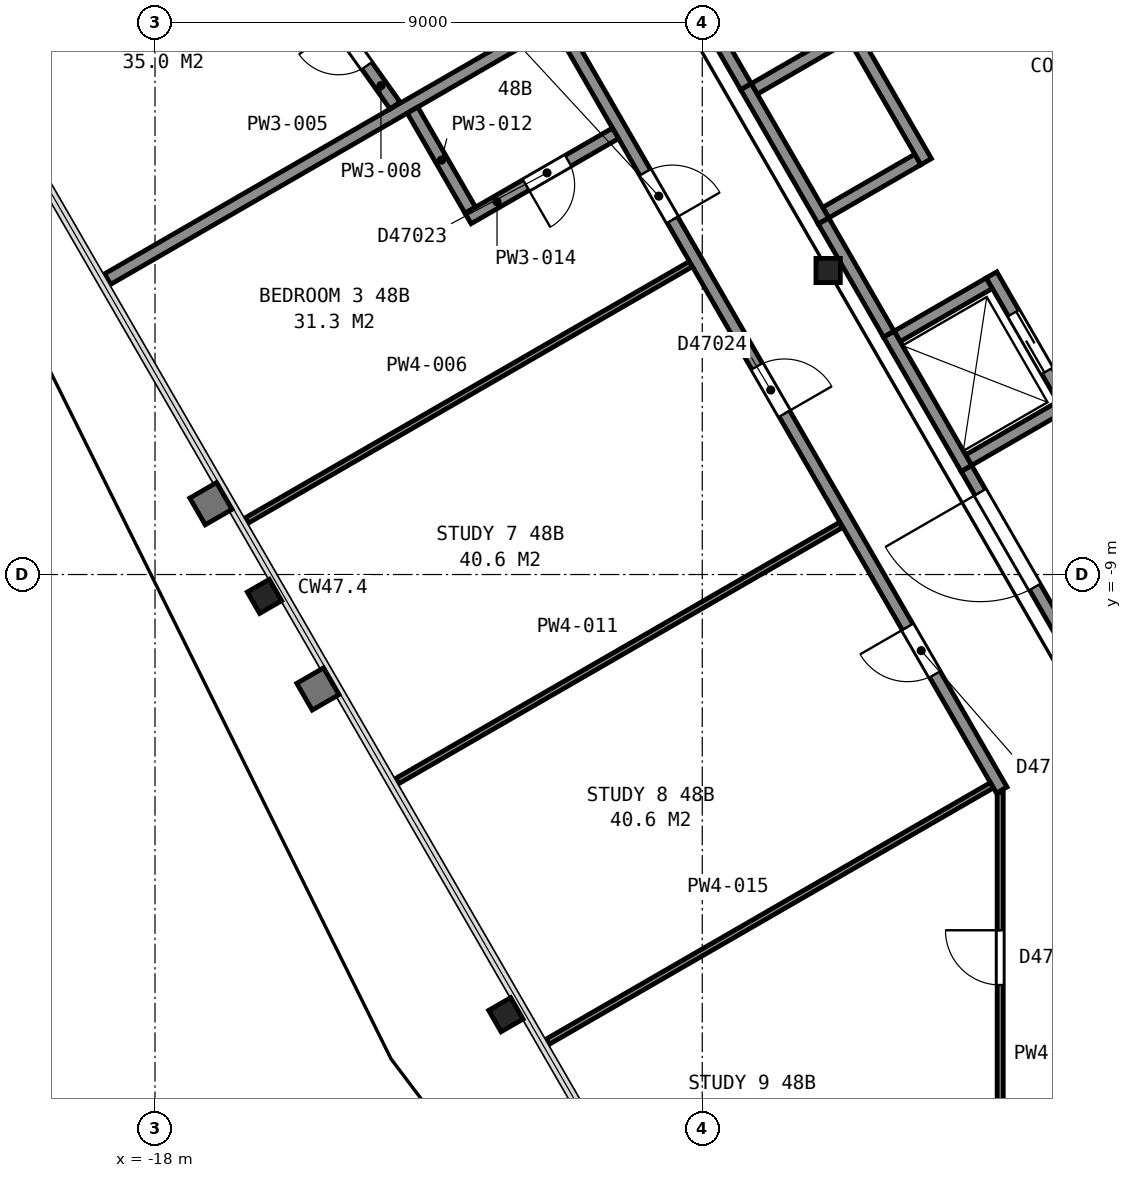
"""IFC4 building model, lengths in metres.
Left out: names, types, materials, properties, quantities, classifications, styles, units other than length and angle.
Written with IfcOpenShell. Run it as: python <this file> out.ifc"""

import sys

from ifc_helpers import new_model, si_unit, direction, frame, frame_2d, origin, origin_2d, place, context, subcontext, project, spatial, rectangle, i_section, extrude, element, fill, save


model = new_model("IFC4")
c1 = context("Model", 3, precision=1e-05, world=origin(), true_north=direction((0.0, 1.0)))
c2 = subcontext(c1, "Body", "Model", "MODEL_VIEW")
j1 = project(units=[si_unit("LENGTHUNIT", "METRE"), si_unit("PLANEANGLEUNIT", "RADIAN")], contexts=[c1])
p1 = place(None, origin())
s1 = spatial("IfcSite", under=j1, at=p1, CompositionType="ELEMENT")
p2 = place(p1, origin())
s2 = spatial("IfcBuilding", under=s1, at=p2, CompositionType="ELEMENT")
p3 = place(p2, frame((0.0, 0.0, 193.2)))
s3 = spatial("IfcBuildingStorey", under=s2, at=p3, CompositionType="ELEMENT", Elevation=193.2)
for number, where, z_axis, x_axis in (
    (1, (-16.2, -9.36, 0.0), (0.0, 0.0, 1.0), (-0.5, 0.866, 0.0)),
    (2, (-12.23, -16.24, 0.0), (0.0, 0.0, 1.0), (-0.5, 0.866, 0.0)),
):
    element("IfcColumn", number, at=place(p3, frame(where, z_axis=z_axis, x_axis=x_axis)), inside=s3, PredefinedType="COLUMN", context=c2, shape_type="SweptSolid", body=[
        extrude(i_section(OverallWidth=0.406, OverallDepth=0.417, WebThickness=0.03, FlangeThickness=0.048, FilletRadius=0.015, at=origin_2d()), origin(), (0.0, 0.0, 1.0), 3.7),
    ])
p4 = place(p3, frame((-6.93, -4.0, 0.0), z_axis=(0.0, 0.0, 1.0), x_axis=(1.0, 0.0, 0.0)))
e3 = element("IfcColumn", 3, at=p4, inside=s3, PredefinedType="COLUMN", context=c2, shape_type="SweptSolid", body=[
    extrude(i_section(OverallWidth=0.401, OverallDepth=0.399, WebThickness=0.025, FlangeThickness=0.04, FilletRadius=0.015, at=origin_2d()), origin(), (0.0, 0.0, 1.0), 3.7),
])
for number, where, z_axis, x_axis in (
    (4, (-4.62, -7.118, 0.0), (0.0, 0.0, 1.0), (0.866, 0.5, 0.0)),
    (5, (-5.795, -5.083, 0.0), (0.0, 0.0, 1.0), (0.866, 0.5, 0.0)),
    (6, (-6.97, -3.048, 0.0), (0.0, 0.0, 1.0), (0.866, 0.5, 0.0)),
):
    element("IfcWall", number, at=place(p3, frame(where, z_axis=z_axis, x_axis=x_axis)), inside=s3, PredefinedType="PARTITIONING", context=c2, shape_type="SweptSolid", body=[
        extrude(rectangle(XDim=1.75, YDim=0.2, at=frame_2d((0.875, 0.0))), origin(), (0.0, 0.0, 1.0), 3.7),
    ])
p5 = place(p3, frame((-8.145, -1.013, 0.0), z_axis=(0.0, 0.0, 1.0), x_axis=(0.866016494683, 0.500015430699, 0.0)))
e7 = element("IfcWall", 7, at=p5, inside=s3, PredefinedType="PARTITIONING", context=c2, shape_type="SweptSolid", body=[
    extrude(rectangle(XDim=3.15, YDim=0.2, at=frame_2d((1.575, 0.0))), origin(), (0.0, 0.0, 1.0), 3.7),
])
p6 = place(p3, frame((-2.968, -6.28, 0.0), z_axis=(0.0, 0.0, 1.0), x_axis=(-0.499990435942, 0.866030925526, 0.0)))
e8 = element("IfcWall", 8, at=p6, inside=s3, PredefinedType="PARTITIONING", context=c2, shape_type="SweptSolid", body=[
    extrude(rectangle(XDim=2.55, YDim=0.2, at=frame_2d((1.275, 0.0))), origin(), (0.0, 0.0, 1.0), 3.7),
])
p7 = place(p6, frame((0.725, 0.0, 0.0)))
e9 = element("IfcOpeningElement", 9, at=p7, cuts=e8, PredefinedType="OPENING", context=c2, shape_type="SweptSolid", body=[
    extrude(rectangle(XDim=1.1, YDim=2.1, at=frame_2d((0.55, 1.05))), frame((0.0, 0.11, 0.0), z_axis=(0.0, -1.0, 0.0), x_axis=(1.0, 0.0, 0.0)), (0.0, 0.0, 1.0), 0.22),
])
p8 = place(p3, frame((-5.318, -2.21, 0.0), z_axis=(0.0, 0.0, 1.0), x_axis=(-0.499938297808, 0.866061024631, 0.0)))
e10 = element("IfcWall", 10, at=p8, inside=s3, PredefinedType="PARTITIONING", context=c2, shape_type="SweptSolid", body=[
    extrude(rectangle(XDim=2.35, YDim=0.2, at=frame_2d((1.175, 0.0))), origin(), (0.0, 0.0, 1.0), 3.7),
])
p9 = place(p3, frame((-7.242, -0.376, 0.0), z_axis=(0.0, 0.0, 1.0), x_axis=(-0.499996545922, 0.866027397988, 0.0)))
e11 = element("IfcWall", 11, at=p9, inside=s3, PredefinedType="PARTITIONING", context=c2, shape_type="SweptSolid", body=[
    extrude(rectangle(XDim=2.75, YDim=0.2, at=frame_2d((1.375, 0.0))), origin(), (0.0, 0.0, 1.0), 3.7),
])
for number, where, z_axis, x_axis in (
    (12, (-4.656, -7.255, 0.0), (0.0, 0.0, 1.0), (-0.5, 0.866, 0.0)),
    (13, (-7.006, -3.185, 0.0), (0.0, 0.0, 1.0), (-0.5, 0.866, 0.0)),
):
    element("IfcWall", number, at=place(p3, frame(where, z_axis=z_axis, x_axis=x_axis)), inside=s3, PredefinedType="PARTITIONING", context=c2, shape_type="SweptSolid", body=[
        extrude(rectangle(XDim=2.55, YDim=0.2, at=frame_2d((1.275, 0.0))), origin(), (0.0, 0.0, 1.0), 3.7),
    ])
p10 = place(p3, frame((-11.591, 4.755, 0.0), z_axis=(0.0, 0.0, 1.0), x_axis=(0.500043977787, -0.866000011708, 0.0)))
e14 = element("IfcWall", 14, at=p10, inside=s3, PredefinedType="PARTITIONING", context=c2, shape_type="SweptSolid", body=[
    extrude(rectangle(XDim=6.617, YDim=0.2, at=frame_2d((3.308, 0.0))), origin(), (0.0, 0.0, 1.0), 3.45),
])
p11 = place(p10, frame((3.695, 0.0, 0.0)))
e15 = element("IfcOpeningElement", 15, at=p11, cuts=e14, PredefinedType="OPENING", context=c2, shape_type="SweptSolid", body=[
    extrude(rectangle(XDim=1.8, YDim=2.1, at=frame_2d((0.9, 1.05))), frame((0.0, 0.11, 0.0), z_axis=(0.0, -1.0, 0.0), x_axis=(1.0, 0.0, 0.0)), (0.0, 0.0, 1.0), 0.22),
])
p12 = place(p3, frame((-7.005, -3.187, 0.0), z_axis=(0.0, 0.0, 1.0), x_axis=(0.499689606989, -0.866204535123, 0.0)))
e16 = element("IfcWall", 16, at=p12, inside=s3, PredefinedType="PARTITIONING", context=c2, shape_type="SweptSolid", body=[
    extrude(rectangle(XDim=2.145, YDim=0.2, at=frame_2d((1.072, 0.0))), origin(), (0.0, 0.0, 1.0), 3.45),
])
p13 = place(p3, frame((-4.655, -7.257, 0.0), z_axis=(0.0, 0.0, 1.0), x_axis=(0.499966124405, -0.866044960985, 0.0)))
e17 = element("IfcWall", 17, at=p13, inside=s3, PredefinedType="PARTITIONING", context=c2, shape_type="SweptSolid", body=[
    extrude(rectangle(XDim=5.956, YDim=0.2, at=frame_2d((2.978, 0.0))), origin(), (0.0, 0.0, 1.0), 3.45),
])
p14 = place(p13, frame((0.45, 0.0, 0.0)))
e18 = element("IfcOpeningElement", 18, at=p14, cuts=e17, PredefinedType="OPENING", context=c2, shape_type="SweptSolid", body=[
    extrude(rectangle(XDim=1.8, YDim=2.1, at=frame_2d((0.9, 1.05))), frame((0.0, 0.11, 0.0), z_axis=(0.0, -1.0, 0.0), x_axis=(1.0, 0.0, 0.0)), (0.0, 0.0, 1.0), 0.22),
])
p15 = place(p3, frame((-18.78, -4.142, 0.0), z_axis=(0.0, 0.0, 1.0), x_axis=(0.866020616849, 0.500008291124, 0.0)))
e19 = element("IfcWall", 19, at=p15, inside=s3, PredefinedType="PARTITIONING", context=c2, shape_type="SweptSolid", body=[
    extrude(rectangle(XDim=8.428, YDim=0.2, at=frame_2d((4.214, 0.0))), origin(), (0.0, 0.0, 1.0), 2.713),
])
p16 = place(p3, frame((-16.489, -8.11, 0.0), z_axis=(0.0, 0.0, 1.0), x_axis=(0.865995531057, 0.500051737513, 0.0)))
e20 = element("IfcWall", 20, at=p16, inside=s3, PredefinedType="PARTITIONING", context=c2, shape_type="SweptSolid", body=[
    extrude(rectangle(XDim=8.429, YDim=0.1, at=frame_2d((4.214, 0.0))), origin(), (0.0, 0.0, 1.0), 2.713),
])
p17 = place(p3, frame((-15.438, 0.663, 0.0), z_axis=(0.0, 0.0, 1.0), x_axis=(0.579721135961, -0.81481495109, 0.0)))
e21 = element("IfcWall", 21, at=p17, inside=s3, PredefinedType="PARTITIONING", context=c2, shape_type="SweptSolid", body=[
    extrude(rectangle(XDim=2.392, YDim=0.2, at=frame_2d((1.196, 0.0))), origin(), (0.0, 0.0, 1.0), 2.713),
])
p18 = place(p17, frame((0.79, 0.0, 0.0)))
e22 = element("IfcOpeningElement", 22, at=p18, cuts=e21, PredefinedType="OPENING", context=c2, shape_type="SweptSolid", body=[
    extrude(rectangle(XDim=0.8, YDim=2.1, at=frame_2d((0.4, 1.05))), frame((0.0, 0.11, 0.0), z_axis=(0.0, -1.0, 0.0), x_axis=(1.0, 0.0, 0.0)), (0.0, 0.0, 1.0), 0.22),
])
p19 = place(p3, frame((-14.015, -12.396, 0.0), z_axis=(0.0, 0.0, 1.0), x_axis=(0.866079962101, 0.499905490315, 0.0)))
e23 = element("IfcWall", 23, at=p19, inside=s3, PredefinedType="PARTITIONING", context=c2, shape_type="SweptSolid", body=[
    extrude(rectangle(XDim=8.429, YDim=0.1, at=frame_2d((4.214, 0.0))), origin(), (0.0, 0.0, 1.0), 2.713),
])
p20 = place(p3, frame((-13.765, -1.362, 0.0), z_axis=(0.0, 0.0, 1.0), x_axis=(0.499911523785, -0.866076479525, 0.0)))
e24 = element("IfcWall", 24, at=p20, inside=s3, PredefinedType="PARTITIONING", context=c2, shape_type="SweptSolid", body=[
    extrude(rectangle(XDim=1.9, YDim=0.2, at=frame_2d((0.95, 0.0))), origin(), (0.0, 0.0, 1.0), 2.713),
])
p21 = place(p3, frame((-4.075, -12.545, 0.0), z_axis=(0.0, 0.0, 1.0), x_axis=(-0.499999743747, 0.866025551732, 0.0)))
e25 = element("IfcWall", 25, at=p21, inside=s3, PredefinedType="PARTITIONING", context=c2, shape_type="SweptSolid", body=[
    extrude(rectangle(XDim=17.656, YDim=0.2, at=frame_2d((8.828, 0.0))), origin(), (0.0, 0.0, 1.0), 2.713),
])
p22 = place(p21, frame((10.83, 0.0, 0.0)))
e26 = element("IfcOpeningElement", 26, at=p22, cuts=e25, PredefinedType="OPENING", context=c2, shape_type="SweptSolid", body=[
    extrude(rectangle(XDim=0.9, YDim=2.1, at=frame_2d((0.45, 1.05))), frame((0.0, 0.11, 0.0), z_axis=(0.0, -1.0, 0.0), x_axis=(1.0, 0.0, 0.0)), (0.0, 0.0, 1.0), 0.22),
])
p23 = place(p21, frame((7.148, 0.0, 0.0)))
e27 = element("IfcOpeningElement", 27, at=p23, cuts=e25, PredefinedType="OPENING", context=c2, shape_type="SweptSolid", body=[
    extrude(rectangle(XDim=0.9, YDim=2.1, at=frame_2d((0.45, 1.05))), frame((0.0, 0.11, 0.0), z_axis=(0.0, -1.0, 0.0), x_axis=(1.0, 0.0, 0.0)), (0.0, 0.0, 1.0), 0.22),
])
p24 = place(p21, frame((2.198, 0.0, 0.0)))
e28 = element("IfcOpeningElement", 28, at=p24, cuts=e25, PredefinedType="OPENING", context=c2, shape_type="SweptSolid", body=[
    extrude(rectangle(XDim=0.9, YDim=2.1, at=frame_2d((0.45, 1.05))), frame((0.0, 0.11, 0.0), z_axis=(0.0, -1.0, 0.0), x_axis=(1.0, 0.0, 0.0)), (0.0, 0.0, 1.0), 0.22),
])
p25 = place(p3, frame((-12.852, -3.144, 0.0), z_axis=(0.0, 0.0, 1.0), x_axis=(0.866018616679, 0.500011755427, 0.0)))
e29 = element("IfcWall", 29, at=p25, inside=s3, PredefinedType="PARTITIONING", context=c2, shape_type="SweptSolid", body=[
    extrude(rectangle(XDim=2.8, YDim=0.2, at=frame_2d((1.4, 0.0))), origin(), (0.0, 0.0, 1.0), 2.713),
])
p26 = place(p25, frame((1.1, 0.0, 0.0)))
e30 = element("IfcOpeningElement", 30, at=p26, cuts=e29, PredefinedType="OPENING", context=c2, shape_type="SweptSolid", body=[
    extrude(rectangle(XDim=0.8, YDim=2.1, at=frame_2d((0.4, 1.05))), frame((0.0, 0.11, 0.0), z_axis=(0.0, -1.0, 0.0), x_axis=(1.0, 0.0, 0.0)), (0.0, 0.0, 1.0), 0.22),
])
p27 = place(p3, frame((-11.54, -16.682, 0.0), z_axis=(0.0, 0.0, 1.0), x_axis=(0.866063141794, 0.499934630153, 0.0)))
e31 = element("IfcWall", 31, at=p27, inside=s3, PredefinedType="PARTITIONING", context=c2, shape_type="SweptSolid", body=[
    extrude(rectangle(XDim=8.433, YDim=0.1, at=frame_2d((4.217, 0.0))), origin(), (0.0, 0.0, 1.0), 2.713),
])
p28 = place(p3, frame((-4.1, -18.016, 0.0), z_axis=(0.0, 0.0, 1.0), x_axis=(0.0, 1.0, 0.0)))
e32 = element("IfcWall", 32, at=p28, inside=s3, PredefinedType="PARTITIONING", context=c2, shape_type="SweptSolid", body=[
    extrude(rectangle(XDim=5.429, YDim=0.1, at=frame_2d((2.715, 0.0))), origin(), (0.0, 0.0, 1.0), 2.713),
])
p29 = place(p28, frame((2.265, 0.0, 0.0)))
e33 = element("IfcOpeningElement", 33, at=p29, cuts=e32, PredefinedType="OPENING", context=c2, shape_type="SweptSolid", body=[
    extrude(rectangle(XDim=0.9, YDim=2.1, at=frame_2d((0.45, 1.05))), frame((0.0, 0.06, 0.0), z_axis=(0.0, -1.0, 0.0), x_axis=(1.0, 0.0, 0.0)), (0.0, 0.0, 1.0), 0.12),
])
p30 = place(p7, origin())
e34 = element("IfcDoor", 34, at=p30, inside=s3, OperationType="SLIDING_TO_RIGHT", PredefinedType="DOOR", context=c2, shape_type="SweptSolid", body=[
    extrude(rectangle(XDim=1.1, YDim=2.1, at=frame_2d((0.55, 1.05))), frame((0.0, 0.025, 0.0), z_axis=(0.0, -1.0, 0.0), x_axis=(1.0, 0.0, 0.0)), (0.0, 0.0, 1.0), 0.05),
])
fill(e9, e34)
p31 = place(p14, origin())
e35 = element("IfcDoor", 35, at=p31, inside=s3, OperationType="DOUBLE_DOOR_SINGLE_SWING", PredefinedType="DOOR", context=c2, shape_type="SweptSolid", body=[
    extrude(rectangle(XDim=1.8, YDim=2.1, at=frame_2d((0.9, 1.05))), frame((0.0, 0.025, 0.0), z_axis=(0.0, -1.0, 0.0), x_axis=(1.0, 0.0, 0.0)), (0.0, 0.0, 1.0), 0.05),
])
fill(e18, e35)
p32 = place(p18, origin())
e36 = element("IfcDoor", 36, at=p32, inside=s3, OperationType="SINGLE_SWING_LEFT", PredefinedType="DOOR", context=c2, shape_type="SweptSolid", body=[
    extrude(rectangle(XDim=0.8, YDim=2.1, at=frame_2d((0.4, 1.05))), frame((0.0, 0.025, 0.0), z_axis=(0.0, -1.0, 0.0), x_axis=(1.0, 0.0, 0.0)), (0.0, 0.0, 1.0), 0.05),
])
fill(e22, e36)
p33 = place(p22, origin())
e37 = element("IfcDoor", 37, at=p33, inside=s3, OperationType="SINGLE_SWING_LEFT", PredefinedType="DOOR", context=c2, shape_type="SweptSolid", body=[
    extrude(rectangle(XDim=0.9, YDim=2.1, at=frame_2d((0.45, 1.05))), frame((0.0, 0.025, 0.0), z_axis=(0.0, -1.0, 0.0), x_axis=(1.0, 0.0, 0.0)), (0.0, 0.0, 1.0), 0.05),
])
fill(e26, e37)
p34 = place(p23, origin())
e38 = element("IfcDoor", 38, at=p34, inside=s3, OperationType="SINGLE_SWING_LEFT", PredefinedType="DOOR", context=c2, shape_type="SweptSolid", body=[
    extrude(rectangle(XDim=0.9, YDim=2.1, at=frame_2d((0.45, 1.05))), frame((0.0, 0.025, 0.0), z_axis=(0.0, -1.0, 0.0), x_axis=(1.0, 0.0, 0.0)), (0.0, 0.0, 1.0), 0.05),
])
fill(e27, e38)
p35 = place(p24, origin())
e39 = element("IfcDoor", 39, at=p35, inside=s3, OperationType="SINGLE_SWING_RIGHT", PredefinedType="DOOR", context=c2, shape_type="SweptSolid", body=[
    extrude(rectangle(XDim=0.9, YDim=2.1, at=frame_2d((0.45, 1.05))), frame((0.0, 0.025, 0.0), z_axis=(0.0, -1.0, 0.0), x_axis=(1.0, 0.0, 0.0)), (0.0, 0.0, 1.0), 0.05),
])
fill(e28, e39)
p36 = place(p26, origin())
e40 = element("IfcDoor", 40, at=p36, inside=s3, OperationType="SINGLE_SWING_LEFT", PredefinedType="DOOR", context=c2, shape_type="SweptSolid", body=[
    extrude(rectangle(XDim=0.8, YDim=2.1, at=frame_2d((0.4, 1.05))), frame((0.0, 0.025, 0.0), z_axis=(0.0, -1.0, 0.0), x_axis=(1.0, 0.0, 0.0)), (0.0, 0.0, 1.0), 0.05),
])
fill(e30, e40)
p37 = place(p29, origin())
e41 = element("IfcDoor", 41, at=p37, inside=s3, OperationType="SINGLE_SWING_RIGHT", PredefinedType="DOOR", context=c2, shape_type="SweptSolid", body=[
    extrude(rectangle(XDim=0.9, YDim=2.1, at=frame_2d((0.45, 1.05))), frame((0.0, 0.025, 0.0), z_axis=(0.0, -1.0, 0.0), x_axis=(1.0, 0.0, 0.0)), (0.0, 0.0, 1.0), 0.05),
])
fill(e33, e41)
save(model, sys.argv[1])
